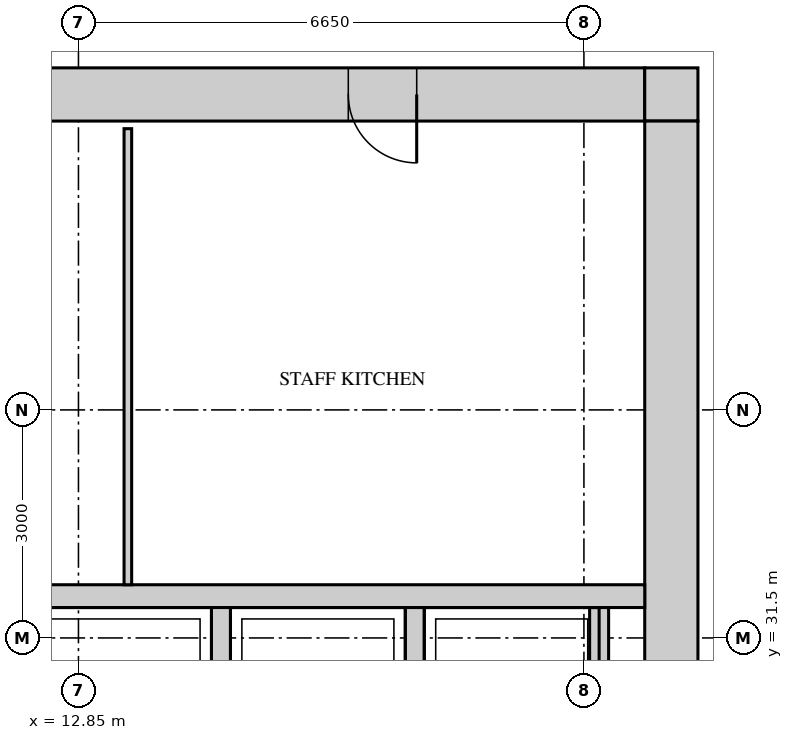
"""IFC4 building model, lengths in metres.
Left out: names, types, materials, properties, quantities, classifications, styles, units other than length and angle.
Written with IfcOpenShell. Run it as: python <this file> out.ifc"""

import sys

from ifc_helpers import new_model, si_unit, direction, frame, frame_2d, origin, place, context, subcontext, project, spatial, rectangle, extrude, source, transform, mapped, element, fill, save


model = new_model("IFC4")
c1 = context("Model", 3, precision=1e-05, world=origin(), true_north=direction((0.0, 1.0)))
c2 = subcontext(c1, "Body", "Model", "MODEL_VIEW")
j1 = project(units=[si_unit("LENGTHUNIT", "METRE"), si_unit("PLANEANGLEUNIT", "RADIAN")], contexts=[c1])
p1 = place(None, origin())
s1 = spatial("IfcSite", under=j1, at=p1, CompositionType="ELEMENT")
p2 = place(p1, origin())
s2 = spatial("IfcBuilding", under=s1, at=p2, CompositionType="ELEMENT")
p3 = place(p2, frame((0.0, 0.0, 246.2)))
s3 = spatial("IfcBuildingStorey", under=s2, at=p3, CompositionType="ELEMENT", Elevation=246.2)
m1 = source(origin(), c2, "Body", "SweptSolid", [
    extrude(rectangle(XDim=13.6, YDim=0.7, at=frame_2d((6.8, 0.0))), origin(), (0.0, 0.0, 1.0), 3.75),
])
p4 = place(p3, frame((6.7, 38.65, 0.0), z_axis=(0.0, 0.0, 1.0), x_axis=(1.0, 0.0, 0.0)))
e1 = element("IfcWall", 1, at=p4, inside=s3, PredefinedType="SHEAR", context=c2, shape_type="MappedRepresentation", body=[
    mapped(m1, transform((0.0, 0.0, 0.0))),
])
m2 = source(origin(), c2, "Body", "SweptSolid", [
    extrude(rectangle(XDim=0.9, YDim=2.1, at=frame_2d((0.45, 1.05))), frame((0.0, 0.36, 0.0), z_axis=(0.0, -1.0, 0.0), x_axis=(1.0, 0.0, 0.0)), (0.0, 0.0, 1.0), 0.72),
])
p5 = place(p4, frame((3.0, 0.0, 0.0)))
e2 = element("IfcOpeningElement", 2, at=p5, cuts=e1, PredefinedType="OPENING", context=c2, shape_type="MappedRepresentation", body=[
    mapped(m2, transform((0.0, 0.0, 0.0))),
])
p6 = place(p4, frame((9.7, 0.0, 0.0)))
e3 = element("IfcOpeningElement", 3, at=p6, cuts=e1, PredefinedType="OPENING", context=c2, shape_type="MappedRepresentation", body=[
    mapped(m2, transform((0.0, 0.0, 0.0))),
])
m3 = source(origin(), c2, "Body", "SweptSolid", [
    extrude(rectangle(XDim=0.7, YDim=0.7, at=frame_2d((0.35, 0.0))), origin(), (0.0, 0.0, 1.0), 3.75),
])
p7 = place(p3, frame((20.3, 38.65, 0.0), z_axis=(0.0, 0.0, 1.0), x_axis=(1.0, 0.0, 0.0)))
e4 = element("IfcWall", 4, at=p7, inside=s3, PredefinedType="SHEAR", context=c2, shape_type="MappedRepresentation", body=[
    mapped(m3, transform((0.0, 0.0, 0.0))),
])
m4 = source(origin(), c2, "Body", "SweptSolid", [
    extrude(rectangle(XDim=22.6, YDim=0.7, at=frame_2d((11.3, 0.0))), origin(), (0.0, 0.0, 1.0), 3.75),
])
p8 = place(p3, frame((20.65, 15.7, 0.0), z_axis=(0.0, 0.0, 1.0), x_axis=(0.0, 1.0, 0.0)))
e5 = element("IfcWall", 5, at=p8, inside=s3, PredefinedType="SHEAR", context=c2, shape_type="MappedRepresentation", body=[
    mapped(m4, transform((0.0, 0.0, 0.0))),
])
m5 = source(origin(), c2, "Body", "SweptSolid", [
    extrude(rectangle(XDim=1.8, YDim=2.1, at=frame_2d((0.9, 1.05))), frame((0.0, 0.36, 0.0), z_axis=(0.0, -1.0, 0.0), x_axis=(1.0, 0.0, 0.0)), (0.0, 0.0, 1.0), 0.72),
])
p9 = place(p8, frame((10.8, 0.0, 0.0)))
e6 = element("IfcOpeningElement", 6, at=p9, cuts=e5, PredefinedType="OPENING", context=c2, shape_type="MappedRepresentation", body=[
    mapped(m5, transform((0.0, 0.0, 0.0))),
])
p10 = place(p8, frame((0.45, 0.0, 0.0)))
e7 = element("IfcOpeningElement", 7, at=p10, cuts=e5, PredefinedType="OPENING", context=c2, shape_type="MappedRepresentation", body=[
    mapped(m2, transform((0.0, 0.0, 0.0))),
])
p11 = place(p8, frame((2.9, 0.0, 0.0)))
e8 = element("IfcOpeningElement", 8, at=p11, cuts=e5, PredefinedType="OPENING", context=c2, shape_type="MappedRepresentation", body=[
    mapped(m2, transform((0.0, 0.0, 0.0))),
])
p12 = place(p8, frame((5.65, 0.0, 0.0)))
e9 = element("IfcOpeningElement", 9, at=p12, cuts=e5, PredefinedType="OPENING", context=c2, shape_type="MappedRepresentation", body=[
    mapped(m2, transform((0.0, 0.0, 0.0))),
])
m6 = source(origin(), c2, "Body", "SweptSolid", [
    extrude(rectangle(XDim=13.6, YDim=0.3, at=frame_2d((6.8, 0.0))), origin(), (0.0, 0.0, 1.0), 3.75),
])
p13 = place(p3, frame((6.7, 32.05, 0.0), z_axis=(0.0, 0.0, 1.0), x_axis=(1.0, 0.0, 0.0)))
e10 = element("IfcWall", 10, at=p13, inside=s3, PredefinedType="STANDARD", context=c2, shape_type="MappedRepresentation", body=[
    mapped(m6, transform((0.0, 0.0, 0.0))),
])
m7 = source(origin(), c2, "Body", "SweptSolid", [
    extrude(rectangle(XDim=2.4, YDim=0.25, at=frame_2d((1.2, 0.0))), origin(), (0.0, 0.0, 1.0), 3.75),
])
for number, where, z_axis, x_axis in (
    (11, (17.275, 29.5, 0.0), (0.0, 0.0, 1.0), (0.0, 1.0, 0.0)),
    (12, (19.7, 29.5, 0.0), (0.0, 0.0, 1.0), (0.0, 1.0, 0.0)),
    (13, (14.725, 29.5, 0.0), (0.0, 0.0, 1.0), (0.0, 1.0, 0.0)),
):
    element("IfcWall", number, at=place(p3, frame(where, z_axis=z_axis, x_axis=x_axis)), inside=s3, PredefinedType="STANDARD", context=c2, shape_type="MappedRepresentation", body=[
        mapped(m7, transform((0.0, 0.0, 0.0))),
    ])
m8 = source(origin(), c2, "Body", "SweptSolid", [
    extrude(rectangle(XDim=6.0, YDim=0.1, at=frame_2d((3.0, 0.0))), origin(), (0.0, 0.0, 1.0), 3.8),
])
p14 = place(p3, frame((13.5, 32.2, 0.0), z_axis=(0.0, 0.0, 1.0), x_axis=(0.0, 1.0, 0.0)))
e14 = element("IfcWall", 14, at=p14, inside=s3, PredefinedType="PARTITIONING", context=c2, shape_type="MappedRepresentation", body=[
    mapped(m8, transform((0.0, 0.0, 0.0))),
])
m9 = source(origin(), c2, "Body", "SweptSolid", [
    extrude(rectangle(XDim=0.9, YDim=2.1, at=frame_2d((0.45, 1.05))), frame((0.0, 0.3, 0.0), z_axis=(0.0, -1.0, 0.0), x_axis=(1.0, 0.0, 0.0)), (0.0, 0.0, 1.0), 0.6),
])
p15 = place(p6, origin())
e15 = element("IfcDoor", 15, at=p15, inside=s3, OperationType="SINGLE_SWING_RIGHT", PredefinedType="DOOR", context=c2, shape_type="MappedRepresentation", body=[
    mapped(m9, transform((0.0, 0.0, 0.0))),
])
fill(e3, e15)
save(model, sys.argv[1])
